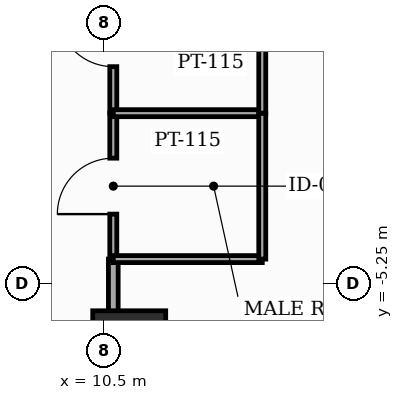
"""IFC4 building model, lengths in metres.
Left out: names, types, materials, properties, quantities, classifications, styles, units other than length and angle.
Written with IfcOpenShell. Run it as: python <this file> out.ifc"""

import sys

from ifc_helpers import new_model, si_unit, direction, frame, frame_2d, origin, origin_2d, place, context, subcontext, project, spatial, rectangle, extrude, element, fill, save


model = new_model("IFC4")
c1 = context("Model", 3, precision=1e-05, world=origin(), true_north=direction((0.0, 1.0)))
c2 = subcontext(c1, "Body", "Model", "MODEL_VIEW")
j1 = project(units=[si_unit("LENGTHUNIT", "METRE"), si_unit("PLANEANGLEUNIT", "RADIAN")], contexts=[c1])
p1 = place(None, origin())
s1 = spatial("IfcSite", under=j1, at=p1, CompositionType="ELEMENT")
p2 = place(p1, origin())
s2 = spatial("IfcBuilding", under=s1, at=p2, CompositionType="ELEMENT")
p3 = place(p2, frame((0.0, 0.0, 154.6)))
s3 = spatial("IfcBuildingStorey", under=s2, at=p3, CompositionType="ELEMENT", Elevation=154.6)
p4 = place(p3, frame((10.912, -6.3, 0.0), z_axis=(0.0, 0.0, 1.0), x_axis=(1.0, 0.0, 0.0)))
e1 = element("IfcColumn", 1, at=p4, inside=s3, PredefinedType="COLUMN", context=c2, shape_type="SweptSolid", body=[
    extrude(rectangle(XDim=1.2, YDim=1.2, at=origin_2d()), origin(), (0.0, 0.0, 1.0), 3.7),
])
p5 = place(p3, frame((10.65, -4.85, 0.0), z_axis=(0.0, 0.0, 1.0), x_axis=(0.0, 1.0, 0.0)))
e2 = element("IfcWall", 2, at=p5, inside=s3, PredefinedType="PARTITIONING", context=c2, shape_type="SweptSolid", body=[
    extrude(rectangle(XDim=2.4, YDim=0.115, at=frame_2d((1.2, 0.0))), origin(), (0.0, 0.0, 1.0), 3.5),
])
p6 = place(p5, frame((0.74, 0.0, 0.0)))
e3 = element("IfcOpeningElement", 3, at=p6, cuts=e2, PredefinedType="OPENING", context=c2, shape_type="SweptSolid", body=[
    extrude(rectangle(XDim=0.92, YDim=2.1, at=frame_2d((0.46, 1.05))), frame((0.0, 0.067, 0.0), z_axis=(0.0, -1.0, 0.0), x_axis=(1.0, 0.0, 0.0)), (0.0, 0.0, 1.0), 0.135),
])
p7 = place(p3, frame((10.65, -2.45, 0.0), z_axis=(0.0, 0.0, 1.0), x_axis=(0.0, 1.0, 0.0)))
e4 = element("IfcWall", 4, at=p7, inside=s3, PredefinedType="PARTITIONING", context=c2, shape_type="SweptSolid", body=[
    extrude(rectangle(XDim=2.45, YDim=0.115, at=frame_2d((1.225, 0.0))), origin(), (0.0, 0.0, 1.0), 2.885),
])
p8 = place(p7, frame((0.765, 0.0, 0.0)))
e5 = element("IfcOpeningElement", 5, at=p8, cuts=e4, PredefinedType="OPENING", context=c2, shape_type="SweptSolid", body=[
    extrude(rectangle(XDim=0.92, YDim=2.1, at=frame_2d((0.46, 1.05))), frame((0.0, 0.067, 0.0), z_axis=(0.0, -1.0, 0.0), x_axis=(1.0, 0.0, 0.0)), (0.0, 0.0, 1.0), 0.135),
])
p9 = place(p3, frame((10.65, -10.15, 0.0), z_axis=(0.0, 0.0, 1.0), x_axis=(0.0, 1.0, 0.0)))
e6 = element("IfcWall", 6, at=p9, inside=s3, PredefinedType="PARTITIONING", context=c2, shape_type="SweptSolid", body=[
    extrude(rectangle(XDim=5.3, YDim=0.16, at=frame_2d((2.65, 0.0))), origin(), (0.0, 0.0, 1.0), 2.875),
])
p10 = place(p9, frame((0.56, 0.0, 0.0)))
e7 = element("IfcOpeningElement", 7, at=p10, cuts=e6, PredefinedType="OPENING", context=c2, shape_type="SweptSolid", body=[
    extrude(rectangle(XDim=1.0, YDim=2.15, at=frame_2d((0.5, 1.075))), frame((0.0, 0.09, 0.0), z_axis=(0.0, -1.0, 0.0), x_axis=(1.0, 0.0, 0.0)), (0.0, 0.0, 1.0), 0.18),
])
for number, where, z_axis, x_axis in (
    (8, (13.1, -2.45, 0.0), (0.0, 0.0, 1.0), (-1.0, 0.0, 0.0)),
    (9, (10.65, -4.85, 0.0), (0.0, 0.0, 1.0), (1.0, 0.0, 0.0)),
):
    element("IfcWall", number, at=place(p3, frame(where, z_axis=z_axis, x_axis=x_axis)), inside=s3, PredefinedType="PARTITIONING", context=c2, shape_type="SweptSolid", body=[
        extrude(rectangle(XDim=2.45, YDim=0.115, at=frame_2d((1.225, 0.0))), origin(), (0.0, 0.0, 1.0), 2.885),
    ])
p11 = place(p3, frame((13.1, -4.85, 0.0), z_axis=(0.0, 0.0, 1.0), x_axis=(0.0, 1.0, 0.0)))
e10 = element("IfcWall", 10, at=p11, inside=s3, PredefinedType="PARTITIONING", context=c2, shape_type="SweptSolid", body=[
    extrude(rectangle(XDim=2.4, YDim=0.115, at=frame_2d((1.2, 0.0))), origin(), (0.0, 0.0, 1.0), 3.5),
])
p12 = place(p3, frame((13.1, -2.45, 0.0), z_axis=(0.0, 0.0, 1.0), x_axis=(0.0, 1.0, 0.0)))
e11 = element("IfcWall", 11, at=p12, inside=s3, PredefinedType="PARTITIONING", context=c2, shape_type="SweptSolid", body=[
    extrude(rectangle(XDim=2.45, YDim=0.115, at=frame_2d((1.225, 0.0))), origin(), (0.0, 0.0, 1.0), 2.885),
])
p13 = place(p6, origin())
e12 = element("IfcDoor", 12, at=p13, inside=s3, OperationType="SINGLE_SWING_LEFT", PredefinedType="DOOR", context=c2, shape_type="SweptSolid", body=[
    extrude(rectangle(XDim=0.92, YDim=2.1, at=frame_2d((0.46, 1.05))), frame((0.0, 0.025, 0.0), z_axis=(0.0, -1.0, 0.0), x_axis=(1.0, 0.0, 0.0)), (0.0, 0.0, 1.0), 0.05),
])
fill(e3, e12)
p14 = place(p8, origin())
e13 = element("IfcDoor", 13, at=p14, inside=s3, OperationType="SINGLE_SWING_RIGHT", PredefinedType="DOOR", context=c2, shape_type="SweptSolid", body=[
    extrude(rectangle(XDim=0.92, YDim=2.1, at=frame_2d((0.46, 1.05))), frame((0.0, 0.025, 0.0), z_axis=(0.0, -1.0, 0.0), x_axis=(1.0, 0.0, 0.0)), (0.0, 0.0, 1.0), 0.05),
])
fill(e5, e13)
save(model, sys.argv[1])
